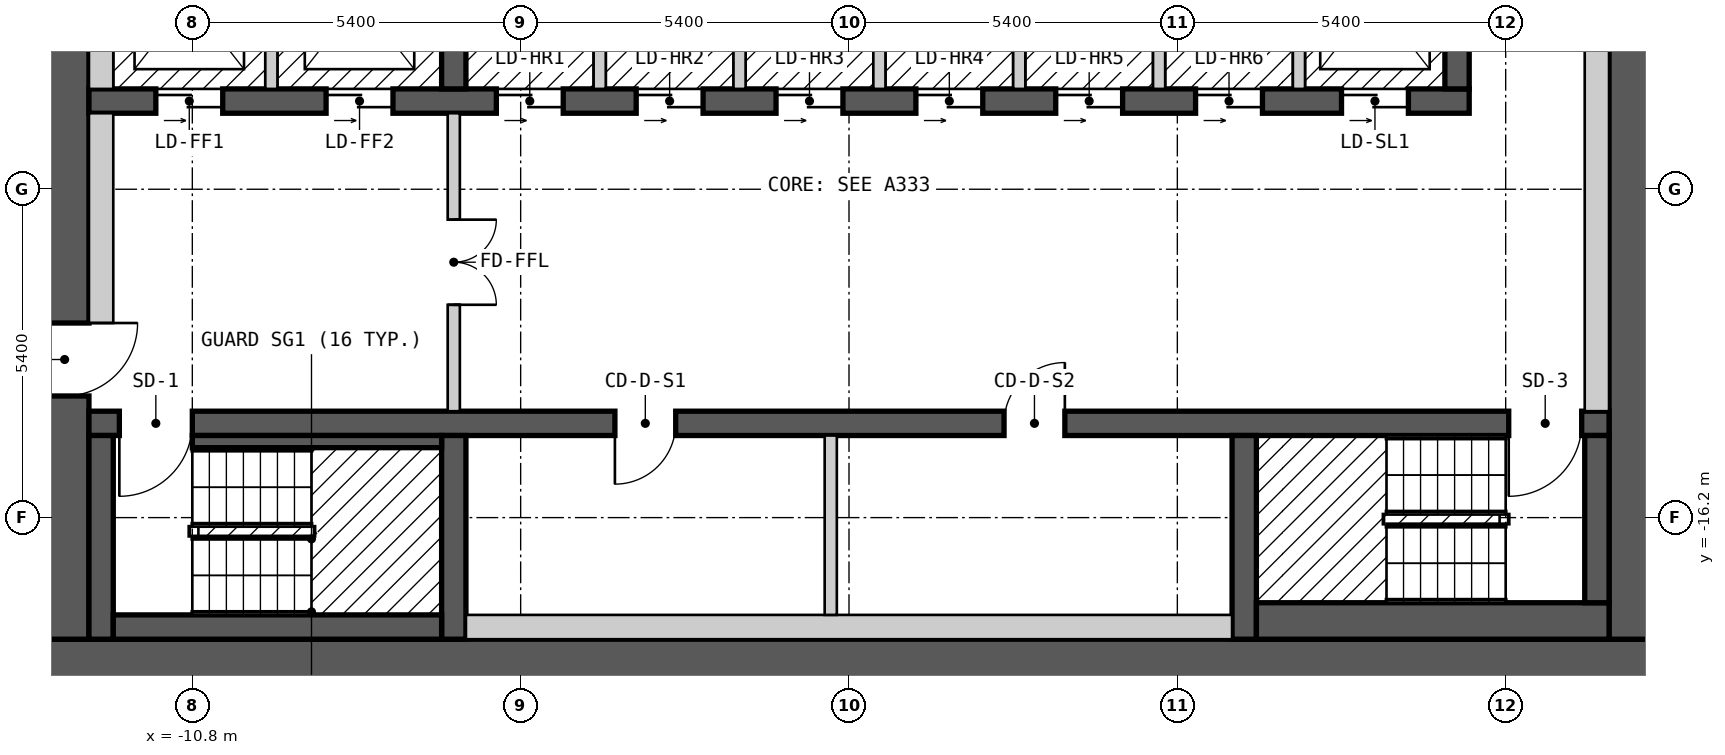
"""IFC4 building model, lengths in metres.
Left out: names, types, materials, properties, quantities, classifications, styles, units other than length and angle.
Written with IfcOpenShell. Run it as: python <this file> out.ifc"""

import sys

from ifc_helpers import new_model, si_unit, direction, frame, frame_2d, origin, place, context, subcontext, project, spatial, rectangle, extrude, element, fill, save


model = new_model("IFC4")
c1 = context("Model", 3, precision=1e-05, world=origin(), true_north=direction((0.0, 1.0)))
c2 = subcontext(c1, "Body", "Model", "MODEL_VIEW")
j1 = project(units=[si_unit("LENGTHUNIT", "METRE"), si_unit("PLANEANGLEUNIT", "RADIAN")], contexts=[c1])
p1 = place(None, origin())
s1 = spatial("IfcSite", under=j1, at=p1, CompositionType="ELEMENT")
p2 = place(p1, origin())
s2 = spatial("IfcBuilding", under=s1, at=p2, CompositionType="ELEMENT")
p3 = place(p2, frame((0.0, 0.0, 117.6)))
s3 = spatial("IfcBuildingStorey", under=s2, at=p3, CompositionType="ELEMENT", Elevation=117.6)
p4 = place(p3, frame((-13.3, -18.6, 0.0), z_axis=(0.0, 0.0, 1.0), x_axis=(1.0, 0.0, 0.0)))
e1 = element("IfcWall", 1, at=p4, inside=s3, PredefinedType="SHEAR", context=c2, shape_type="SweptSolid", body=[
    extrude(rectangle(XDim=26.6, YDim=0.8, at=frame_2d((13.3, 0.0))), origin(), (0.0, 0.0, 1.0), 2.7),
])
p5 = place(p3, frame((-12.9, -18.2, 0.0), z_axis=(0.0, 0.0, 1.0), x_axis=(0.0, 1.0, 0.0)))
e2 = element("IfcWall", 2, at=p5, inside=s3, PredefinedType="SHEAR", context=c2, shape_type="SweptSolid", body=[
    extrude(rectangle(XDim=12.4, YDim=0.8, at=frame_2d((6.2, 0.0))), origin(), (0.0, 0.0, 1.0), 2.7),
])
p6 = place(p5, frame((4.0, 0.0, 0.0)))
e3 = element("IfcOpeningElement", 3, at=p6, cuts=e2, PredefinedType="OPENING", context=c2, shape_type="SweptSolid", body=[
    extrude(rectangle(XDim=1.2, YDim=2.1, at=frame_2d((0.6, 1.05))), frame((0.0, 0.41, 0.0), z_axis=(0.0, -1.0, 0.0), x_axis=(1.0, 0.0, 0.0)), (0.0, 0.0, 1.0), 0.82),
])
p7 = place(p3, frame((12.9, -18.2, 0.0), z_axis=(0.0, 0.0, 1.0), x_axis=(0.0, 1.0, 0.0)))
e4 = element("IfcWall", 4, at=p7, inside=s3, PredefinedType="SHEAR", context=c2, shape_type="SweptSolid", body=[
    extrude(rectangle(XDim=12.4, YDim=0.8, at=frame_2d((6.2, 0.0))), origin(), (0.0, 0.0, 1.0), 2.7),
])
p8 = place(p3, frame((-12.5, -14.65, 0.0), z_axis=(0.0, 0.0, 1.0), x_axis=(1.0, 0.0, 0.0)))
e5 = element("IfcWall", 5, at=p8, inside=s3, PredefinedType="SHEAR", context=c2, shape_type="SweptSolid", body=[
    extrude(rectangle(XDim=25.0, YDim=0.4, at=frame_2d((12.5, 0.0))), origin(), (0.0, 0.0, 1.0), 2.7),
])
p9 = place(p8, frame((1.7, 0.0, 0.0), z_axis=(0.0, 0.0, 1.0), x_axis=(-1.0, 0.0, 0.0)))
e6 = element("IfcOpeningElement", 6, at=p9, cuts=e5, PredefinedType="OPENING", context=c2, shape_type="SweptSolid", body=[
    extrude(rectangle(XDim=1.2, YDim=2.1, at=frame_2d((0.6, 1.05))), frame((0.0, 0.21, 0.0), z_axis=(0.0, -1.0, 0.0), x_axis=(1.0, 0.0, 0.0)), (0.0, 0.0, 1.0), 0.42),
])
p10 = place(p8, frame((24.55, 0.0, 0.0), z_axis=(0.0, 0.0, 1.0), x_axis=(-1.0, 0.0, 0.0)))
e7 = element("IfcOpeningElement", 7, at=p10, cuts=e5, PredefinedType="OPENING", context=c2, shape_type="SweptSolid", body=[
    extrude(rectangle(XDim=1.2, YDim=2.1, at=frame_2d((0.6, 1.05))), frame((0.0, 0.21, 0.0), z_axis=(0.0, -1.0, 0.0), x_axis=(1.0, 0.0, 0.0)), (0.0, 0.0, 1.0), 0.42),
])
p11 = place(p8, frame((9.65, 0.0, 0.0), z_axis=(0.0, 0.0, 1.0), x_axis=(-1.0, 0.0, 0.0)))
e8 = element("IfcOpeningElement", 8, at=p11, cuts=e5, PredefinedType="OPENING", context=c2, shape_type="SweptSolid", body=[
    extrude(rectangle(XDim=1.0, YDim=2.1, at=frame_2d((0.5, 1.05))), frame((0.0, 0.21, 0.0), z_axis=(0.0, -1.0, 0.0), x_axis=(1.0, 0.0, 0.0)), (0.0, 0.0, 1.0), 0.42),
])
p12 = place(p8, frame((16.05, 0.0, 0.0), z_axis=(0.0, 0.0, 1.0), x_axis=(-1.0, 0.0, 0.0)))
e9 = element("IfcOpeningElement", 9, at=p12, cuts=e5, PredefinedType="OPENING", context=c2, shape_type="SweptSolid", body=[
    extrude(rectangle(XDim=1.0, YDim=2.1, at=frame_2d((0.5, 1.05))), frame((0.0, 0.21, 0.0), z_axis=(0.0, -1.0, 0.0), x_axis=(1.0, 0.0, 0.0)), (0.0, 0.0, 1.0), 0.42),
])
p13 = place(p3, frame((-12.5, -9.35, 0.0), z_axis=(0.0, 0.0, 1.0), x_axis=(1.0, 0.0, 0.0)))
e10 = element("IfcWall", 10, at=p13, inside=s3, PredefinedType="SHEAR", context=c2, shape_type="SweptSolid", body=[
    extrude(rectangle(XDim=22.7, YDim=0.4, at=frame_2d((11.35, 0.0))), origin(), (0.0, 0.0, 1.0), 2.7),
])
p14 = place(p13, frame((1.1, 0.0, 0.0)))
e11 = element("IfcOpeningElement", 11, at=p14, cuts=e10, PredefinedType="OPENING", context=c2, shape_type="SweptSolid", body=[
    extrude(rectangle(XDim=1.1, YDim=2.1, at=frame_2d((0.55, 1.05))), frame((0.0, 0.21, 0.0), z_axis=(0.0, -1.0, 0.0), x_axis=(1.0, 0.0, 0.0)), (0.0, 0.0, 1.0), 0.42),
])
p15 = place(p13, frame((3.9, 0.0, 0.0)))
e12 = element("IfcOpeningElement", 12, at=p15, cuts=e10, PredefinedType="OPENING", context=c2, shape_type="SweptSolid", body=[
    extrude(rectangle(XDim=1.1, YDim=2.1, at=frame_2d((0.55, 1.05))), frame((0.0, 0.21, 0.0), z_axis=(0.0, -1.0, 0.0), x_axis=(1.0, 0.0, 0.0)), (0.0, 0.0, 1.0), 0.42),
])
p16 = place(p13, frame((6.7, 0.0, 0.0)))
e13 = element("IfcOpeningElement", 13, at=p16, cuts=e10, PredefinedType="OPENING", context=c2, shape_type="SweptSolid", body=[
    extrude(rectangle(XDim=1.1, YDim=2.1, at=frame_2d((0.55, 1.05))), frame((0.0, 0.21, 0.0), z_axis=(0.0, -1.0, 0.0), x_axis=(1.0, 0.0, 0.0)), (0.0, 0.0, 1.0), 0.42),
])
p17 = place(p13, frame((9.0, 0.0, 0.0)))
e14 = element("IfcOpeningElement", 14, at=p17, cuts=e10, PredefinedType="OPENING", context=c2, shape_type="SweptSolid", body=[
    extrude(rectangle(XDim=1.1, YDim=2.1, at=frame_2d((0.55, 1.05))), frame((0.0, 0.21, 0.0), z_axis=(0.0, -1.0, 0.0), x_axis=(1.0, 0.0, 0.0)), (0.0, 0.0, 1.0), 0.42),
])
p18 = place(p13, frame((11.3, 0.0, 0.0)))
e15 = element("IfcOpeningElement", 15, at=p18, cuts=e10, PredefinedType="OPENING", context=c2, shape_type="SweptSolid", body=[
    extrude(rectangle(XDim=1.1, YDim=2.1, at=frame_2d((0.55, 1.05))), frame((0.0, 0.21, 0.0), z_axis=(0.0, -1.0, 0.0), x_axis=(1.0, 0.0, 0.0)), (0.0, 0.0, 1.0), 0.42),
])
p19 = place(p13, frame((13.6, 0.0, 0.0)))
e16 = element("IfcOpeningElement", 16, at=p19, cuts=e10, PredefinedType="OPENING", context=c2, shape_type="SweptSolid", body=[
    extrude(rectangle(XDim=1.1, YDim=2.1, at=frame_2d((0.55, 1.05))), frame((0.0, 0.21, 0.0), z_axis=(0.0, -1.0, 0.0), x_axis=(1.0, 0.0, 0.0)), (0.0, 0.0, 1.0), 0.42),
])
p20 = place(p13, frame((15.9, 0.0, 0.0)))
e17 = element("IfcOpeningElement", 17, at=p20, cuts=e10, PredefinedType="OPENING", context=c2, shape_type="SweptSolid", body=[
    extrude(rectangle(XDim=1.1, YDim=2.1, at=frame_2d((0.55, 1.05))), frame((0.0, 0.21, 0.0), z_axis=(0.0, -1.0, 0.0), x_axis=(1.0, 0.0, 0.0)), (0.0, 0.0, 1.0), 0.42),
])
p21 = place(p13, frame((18.2, 0.0, 0.0)))
e18 = element("IfcOpeningElement", 18, at=p21, cuts=e10, PredefinedType="OPENING", context=c2, shape_type="SweptSolid", body=[
    extrude(rectangle(XDim=1.1, YDim=2.1, at=frame_2d((0.55, 1.05))), frame((0.0, 0.21, 0.0), z_axis=(0.0, -1.0, 0.0), x_axis=(1.0, 0.0, 0.0)), (0.0, 0.0, 1.0), 0.42),
])
p22 = place(p13, frame((20.6, 0.0, 0.0)))
e19 = element("IfcOpeningElement", 19, at=p22, cuts=e10, PredefinedType="OPENING", context=c2, shape_type="SweptSolid", body=[
    extrude(rectangle(XDim=1.1, YDim=2.1, at=frame_2d((0.55, 1.05))), frame((0.0, 0.21, 0.0), z_axis=(0.0, -1.0, 0.0), x_axis=(1.0, 0.0, 0.0)), (0.0, 0.0, 1.0), 0.42),
])
for number, where, z_axis, x_axis in (
    (20, (-6.5, -18.2, 0.0), (0.0, 0.0, 1.0), (0.0, 1.0, 0.0)),
    (21, (6.5, -18.2, 0.0), (0.0, 0.0, 1.0), (0.0, 1.0, 0.0)),
    (22, (-6.5, -9.15, 0.0), (0.0, 0.0, 1.0), (0.0, 1.0, 0.0)),
    (23, (10.0, -9.15, 0.0), (0.0, 0.0, 1.0), (0.0, 1.0, 0.0)),
):
    element("IfcWall", number, at=place(p3, frame(where, z_axis=z_axis, x_axis=x_axis)), inside=s3, PredefinedType="SHEAR", context=c2, shape_type="SweptSolid", body=[
        extrude(rectangle(XDim=3.35, YDim=0.4, at=frame_2d((1.675, 0.0))), origin(), (0.0, 0.0, 1.0), 2.7),
    ])
p23 = place(p3, frame((-12.3, -18.2, 0.0), z_axis=(0.0, 0.0, 1.0), x_axis=(0.0, 1.0, 0.0)))
e24 = element("IfcWall", 24, at=p23, inside=s3, PredefinedType="SOLIDWALL", context=c2, shape_type="SweptSolid", body=[
    extrude(rectangle(XDim=3.35, YDim=0.4, at=frame_2d((1.675, 0.0))), origin(), (0.0, 0.0, 1.0), 2.7),
])
p24 = place(p3, frame((-12.3, -13.0, 0.0), z_axis=(0.0, 0.0, 1.0), x_axis=(0.0, 1.0, 0.0)))
e25 = element("IfcWall", 25, at=p24, inside=s3, PredefinedType="PARTITIONING", context=c2, shape_type="SweptSolid", body=[
    extrude(rectangle(XDim=3.45, YDim=0.4, at=frame_2d((1.725, 0.0))), origin(), (0.0, 0.0, 1.0), 2.7),
])
p25 = place(p3, frame((-12.3, -9.15, 0.0), z_axis=(0.0, 0.0, 1.0), x_axis=(0.0, 1.0, 0.0)))
e26 = element("IfcWall", 26, at=p25, inside=s3, PredefinedType="SOLIDWALL", context=c2, shape_type="SweptSolid", body=[
    extrude(rectangle(XDim=3.35, YDim=0.4, at=frame_2d((1.675, 0.0))), origin(), (0.0, 0.0, 1.0), 2.7),
])
p26 = place(p3, frame((-12.1, -18.0, 0.0), z_axis=(0.0, 0.0, 1.0), x_axis=(1.0, 0.0, 0.0)))
e27 = element("IfcWall", 27, at=p26, inside=s3, PredefinedType="SOLIDWALL", context=c2, shape_type="SweptSolid", body=[
    extrude(rectangle(XDim=5.4, YDim=0.4, at=frame_2d((2.7, 0.0))), origin(), (0.0, 0.0, 1.0), 2.7),
])
p27 = place(p3, frame((-10.8, -14.95, 0.0), z_axis=(0.0, 0.0, 1.0), x_axis=(1.0, 0.0, 0.0)))
e28 = element("IfcWall", 28, at=p27, inside=s3, PredefinedType="SOLIDWALL", context=c2, shape_type="SweptSolid", body=[
    extrude(rectangle(XDim=4.1, YDim=0.2, at=frame_2d((2.05, 0.0))), origin(), (0.0, 0.0, 1.0), 2.7),
])
p28 = place(p3, frame((-9.5, -9.15, 0.0), z_axis=(0.0, 0.0, 1.0), x_axis=(0.0, 1.0, 0.0)))
e29 = element("IfcWall", 29, at=p28, inside=s3, PredefinedType="SOLIDWALL", context=c2, shape_type="SweptSolid", body=[
    extrude(rectangle(XDim=2.95, YDim=0.2, at=frame_2d((1.475, 0.0))), origin(), (0.0, 0.0, 1.0), 2.7),
])
p29 = place(p3, frame((-6.5, -14.45, 0.0), z_axis=(0.0, 0.0, 1.0), x_axis=(0.0, 1.0, 0.0)))
e30 = element("IfcWall", 30, at=p29, inside=s3, PredefinedType="PARTITIONING", context=c2, shape_type="SweptSolid", body=[
    extrude(rectangle(XDim=4.9, YDim=0.2, at=frame_2d((2.45, 0.0))), origin(), (0.0, 0.0, 1.0), 2.7),
])
p30 = place(p29, frame((3.15, 0.0, 0.0), z_axis=(0.0, 0.0, 1.0), x_axis=(-1.0, 0.0, 0.0)))
e31 = element("IfcOpeningElement", 31, at=p30, cuts=e30, PredefinedType="OPENING", context=c2, shape_type="SweptSolid", body=[
    extrude(rectangle(XDim=1.4, YDim=2.1, at=frame_2d((0.7, 1.05))), frame((0.0, 0.11, 0.0), z_axis=(0.0, -1.0, 0.0), x_axis=(1.0, 0.0, 0.0)), (0.0, 0.0, 1.0), 0.22),
])
p31 = place(p3, frame((-6.3, -18.0, 0.0), z_axis=(0.0, 0.0, 1.0), x_axis=(1.0, 0.0, 0.0)))
e32 = element("IfcWall", 32, at=p31, inside=s3, PredefinedType="PARTITIONING", context=c2, shape_type="SweptSolid", body=[
    extrude(rectangle(XDim=12.6, YDim=0.4, at=frame_2d((6.3, 0.0))), origin(), (0.0, 0.0, 1.0), 2.7),
])
for number, where, z_axis, x_axis in (
    (33, (-4.1, -9.15, 0.0), (0.0, 0.0, 1.0), (0.0, 1.0, 0.0)),
    (34, (-1.8, -9.15, 0.0), (0.0, 0.0, 1.0), (0.0, 1.0, 0.0)),
):
    element("IfcWall", number, at=place(p3, frame(where, z_axis=z_axis, x_axis=x_axis)), inside=s3, PredefinedType="SOLIDWALL", context=c2, shape_type="SweptSolid", body=[
        extrude(rectangle(XDim=2.95, YDim=0.2, at=frame_2d((1.475, 0.0))), origin(), (0.0, 0.0, 1.0), 2.7),
    ])
p32 = place(p3, frame((-0.3, -17.8, 0.0), z_axis=(0.0, 0.0, 1.0), x_axis=(0.0, 1.0, 0.0)))
e35 = element("IfcWall", 35, at=p32, inside=s3, PredefinedType="PARTITIONING", context=c2, shape_type="SweptSolid", body=[
    extrude(rectangle(XDim=2.95, YDim=0.2, at=frame_2d((1.475, 0.0))), origin(), (0.0, 0.0, 1.0), 2.7),
])
for number, where, z_axis, x_axis in (
    (36, (0.5, -9.15, 0.0), (0.0, 0.0, 1.0), (0.0, 1.0, 0.0)),
    (37, (2.8, -9.15, 0.0), (0.0, 0.0, 1.0), (0.0, 1.0, 0.0)),
    (38, (5.1, -9.15, 0.0), (0.0, 0.0, 1.0), (0.0, 1.0, 0.0)),
):
    element("IfcWall", number, at=place(p3, frame(where, z_axis=z_axis, x_axis=x_axis)), inside=s3, PredefinedType="SOLIDWALL", context=c2, shape_type="SweptSolid", body=[
        extrude(rectangle(XDim=2.95, YDim=0.2, at=frame_2d((1.475, 0.0))), origin(), (0.0, 0.0, 1.0), 2.7),
    ])
p33 = place(p3, frame((6.7, -17.9, 0.0), z_axis=(0.0, 0.0, 1.0), x_axis=(1.0, 0.0, 0.0)))
e39 = element("IfcWall", 39, at=p33, inside=s3, PredefinedType="SOLIDWALL", context=c2, shape_type="SweptSolid", body=[
    extrude(rectangle(XDim=5.8, YDim=0.6, at=frame_2d((2.9, 0.0))), origin(), (0.0, 0.0, 1.0), 2.7),
])
p34 = place(p3, frame((7.4, -9.15, 0.0), z_axis=(0.0, 0.0, 1.0), x_axis=(0.0, 1.0, 0.0)))
e40 = element("IfcWall", 40, at=p34, inside=s3, PredefinedType="SOLIDWALL", context=c2, shape_type="SweptSolid", body=[
    extrude(rectangle(XDim=2.95, YDim=0.2, at=frame_2d((1.475, 0.0))), origin(), (0.0, 0.0, 1.0), 2.7),
])
p35 = place(p3, frame((12.3, -17.6, 0.0), z_axis=(0.0, 0.0, 1.0), x_axis=(0.0, 1.0, 0.0)))
e41 = element("IfcWall", 41, at=p35, inside=s3, PredefinedType="SOLIDWALL", context=c2, shape_type="SweptSolid", body=[
    extrude(rectangle(XDim=2.75, YDim=0.4, at=frame_2d((1.375, 0.0))), origin(), (0.0, 0.0, 1.0), 2.7),
])
p36 = place(p3, frame((12.3, -14.45, 0.0), z_axis=(0.0, 0.0, 1.0), x_axis=(0.0, 1.0, 0.0)))
e42 = element("IfcWall", 42, at=p36, inside=s3, PredefinedType="PARTITIONING", context=c2, shape_type="SweptSolid", body=[
    extrude(rectangle(XDim=8.25, YDim=0.4, at=frame_2d((4.125, 0.0))), origin(), (0.0, 0.0, 1.0), 2.7),
])
p37 = place(p14, origin())
e43 = element("IfcDoor", 43, at=p37, inside=s3, OperationType="DOUBLE_DOOR_SLIDING", PredefinedType="DOOR", context=c2, shape_type="SweptSolid", body=[
    extrude(rectangle(XDim=1.1, YDim=2.1, at=frame_2d((0.55, 1.05))), frame((0.0, 0.025, 0.0), z_axis=(0.0, -1.0, 0.0), x_axis=(1.0, 0.0, 0.0)), (0.0, 0.0, 1.0), 0.05),
])
fill(e11, e43)
p38 = place(p15, origin())
e44 = element("IfcDoor", 44, at=p38, inside=s3, OperationType="DOUBLE_DOOR_SLIDING", PredefinedType="DOOR", context=c2, shape_type="SweptSolid", body=[
    extrude(rectangle(XDim=1.1, YDim=2.1, at=frame_2d((0.55, 1.05))), frame((0.0, 0.025, 0.0), z_axis=(0.0, -1.0, 0.0), x_axis=(1.0, 0.0, 0.0)), (0.0, 0.0, 1.0), 0.05),
])
fill(e12, e44)
p39 = place(p16, origin())
e45 = element("IfcDoor", 45, at=p39, inside=s3, OperationType="DOUBLE_DOOR_SLIDING", PredefinedType="DOOR", context=c2, shape_type="SweptSolid", body=[
    extrude(rectangle(XDim=1.1, YDim=2.1, at=frame_2d((0.55, 1.05))), frame((0.0, 0.025, 0.0), z_axis=(0.0, -1.0, 0.0), x_axis=(1.0, 0.0, 0.0)), (0.0, 0.0, 1.0), 0.05),
])
fill(e13, e45)
p40 = place(p17, origin())
e46 = element("IfcDoor", 46, at=p40, inside=s3, OperationType="DOUBLE_DOOR_SLIDING", PredefinedType="DOOR", context=c2, shape_type="SweptSolid", body=[
    extrude(rectangle(XDim=1.1, YDim=2.1, at=frame_2d((0.55, 1.05))), frame((0.0, 0.025, 0.0), z_axis=(0.0, -1.0, 0.0), x_axis=(1.0, 0.0, 0.0)), (0.0, 0.0, 1.0), 0.05),
])
fill(e14, e46)
p41 = place(p18, origin())
e47 = element("IfcDoor", 47, at=p41, inside=s3, OperationType="DOUBLE_DOOR_SLIDING", PredefinedType="DOOR", context=c2, shape_type="SweptSolid", body=[
    extrude(rectangle(XDim=1.1, YDim=2.1, at=frame_2d((0.55, 1.05))), frame((0.0, 0.025, 0.0), z_axis=(0.0, -1.0, 0.0), x_axis=(1.0, 0.0, 0.0)), (0.0, 0.0, 1.0), 0.05),
])
fill(e15, e47)
p42 = place(p19, origin())
e48 = element("IfcDoor", 48, at=p42, inside=s3, OperationType="DOUBLE_DOOR_SLIDING", PredefinedType="DOOR", context=c2, shape_type="SweptSolid", body=[
    extrude(rectangle(XDim=1.1, YDim=2.1, at=frame_2d((0.55, 1.05))), frame((0.0, 0.025, 0.0), z_axis=(0.0, -1.0, 0.0), x_axis=(1.0, 0.0, 0.0)), (0.0, 0.0, 1.0), 0.05),
])
fill(e16, e48)
p43 = place(p20, origin())
e49 = element("IfcDoor", 49, at=p43, inside=s3, OperationType="DOUBLE_DOOR_SLIDING", PredefinedType="DOOR", context=c2, shape_type="SweptSolid", body=[
    extrude(rectangle(XDim=1.1, YDim=2.1, at=frame_2d((0.55, 1.05))), frame((0.0, 0.025, 0.0), z_axis=(0.0, -1.0, 0.0), x_axis=(1.0, 0.0, 0.0)), (0.0, 0.0, 1.0), 0.05),
])
fill(e17, e49)
p44 = place(p21, origin())
e50 = element("IfcDoor", 50, at=p44, inside=s3, OperationType="DOUBLE_DOOR_SLIDING", PredefinedType="DOOR", context=c2, shape_type="SweptSolid", body=[
    extrude(rectangle(XDim=1.1, YDim=2.1, at=frame_2d((0.55, 1.05))), frame((0.0, 0.025, 0.0), z_axis=(0.0, -1.0, 0.0), x_axis=(1.0, 0.0, 0.0)), (0.0, 0.0, 1.0), 0.05),
])
fill(e18, e50)
p45 = place(p22, origin())
e51 = element("IfcDoor", 51, at=p45, inside=s3, OperationType="DOUBLE_DOOR_SLIDING", PredefinedType="DOOR", context=c2, shape_type="SweptSolid", body=[
    extrude(rectangle(XDim=1.1, YDim=2.1, at=frame_2d((0.55, 1.05))), frame((0.0, 0.025, 0.0), z_axis=(0.0, -1.0, 0.0), x_axis=(1.0, 0.0, 0.0)), (0.0, 0.0, 1.0), 0.05),
])
fill(e19, e51)
p46 = place(p9, origin())
e52 = element("IfcDoor", 52, at=p46, inside=s3, OperationType="SINGLE_SWING_RIGHT", PredefinedType="DOOR", context=c2, shape_type="SweptSolid", body=[
    extrude(rectangle(XDim=1.2, YDim=2.1, at=frame_2d((0.6, 1.05))), frame((0.0, 0.025, 0.0), z_axis=(0.0, -1.0, 0.0), x_axis=(1.0, 0.0, 0.0)), (0.0, 0.0, 1.0), 0.05),
])
fill(e6, e52)
p47 = place(p10, origin())
e53 = element("IfcDoor", 53, at=p47, inside=s3, OperationType="SINGLE_SWING_RIGHT", PredefinedType="DOOR", context=c2, shape_type="SweptSolid", body=[
    extrude(rectangle(XDim=1.2, YDim=2.1, at=frame_2d((0.6, 1.05))), frame((0.0, 0.025, 0.0), z_axis=(0.0, -1.0, 0.0), x_axis=(1.0, 0.0, 0.0)), (0.0, 0.0, 1.0), 0.05),
])
fill(e7, e53)
p48 = place(p6, origin())
e54 = element("IfcDoor", 54, at=p48, inside=s3, OperationType="SINGLE_SWING_RIGHT", PredefinedType="DOOR", context=c2, shape_type="SweptSolid", body=[
    extrude(rectangle(XDim=1.2, YDim=2.1, at=frame_2d((0.6, 1.05))), frame((0.0, 0.025, 0.0), z_axis=(0.0, -1.0, 0.0), x_axis=(1.0, 0.0, 0.0)), (0.0, 0.0, 1.0), 0.05),
])
fill(e3, e54)
p49 = place(p30, origin())
e55 = element("IfcDoor", 55, at=p49, inside=s3, OperationType="DOUBLE_DOOR_SINGLE_SWING", PredefinedType="DOOR", context=c2, shape_type="SweptSolid", body=[
    extrude(rectangle(XDim=1.4, YDim=2.1, at=frame_2d((0.7, 1.05))), frame((0.0, 0.025, 0.0), z_axis=(0.0, -1.0, 0.0), x_axis=(1.0, 0.0, 0.0)), (0.0, 0.0, 1.0), 0.05),
])
fill(e31, e55)
p50 = place(p11, origin())
e56 = element("IfcDoor", 56, at=p50, inside=s3, OperationType="SINGLE_SWING_RIGHT", PredefinedType="DOOR", context=c2, shape_type="SweptSolid", body=[
    extrude(rectangle(XDim=1.0, YDim=2.1, at=frame_2d((0.5, 1.05))), frame((0.0, 0.025, 0.0), z_axis=(0.0, -1.0, 0.0), x_axis=(1.0, 0.0, 0.0)), (0.0, 0.0, 1.0), 0.05),
])
fill(e8, e56)
p51 = place(p12, origin())
e57 = element("IfcDoor", 57, at=p51, inside=s3, OperationType="SINGLE_SWING_LEFT", PredefinedType="DOOR", context=c2, shape_type="SweptSolid", body=[
    extrude(rectangle(XDim=1.0, YDim=2.1, at=frame_2d((0.5, 1.05))), frame((0.0, 0.025, 0.0), z_axis=(0.0, -1.0, 0.0), x_axis=(1.0, 0.0, 0.0)), (0.0, 0.0, 1.0), 0.05),
])
fill(e9, e57)
save(model, sys.argv[1])
